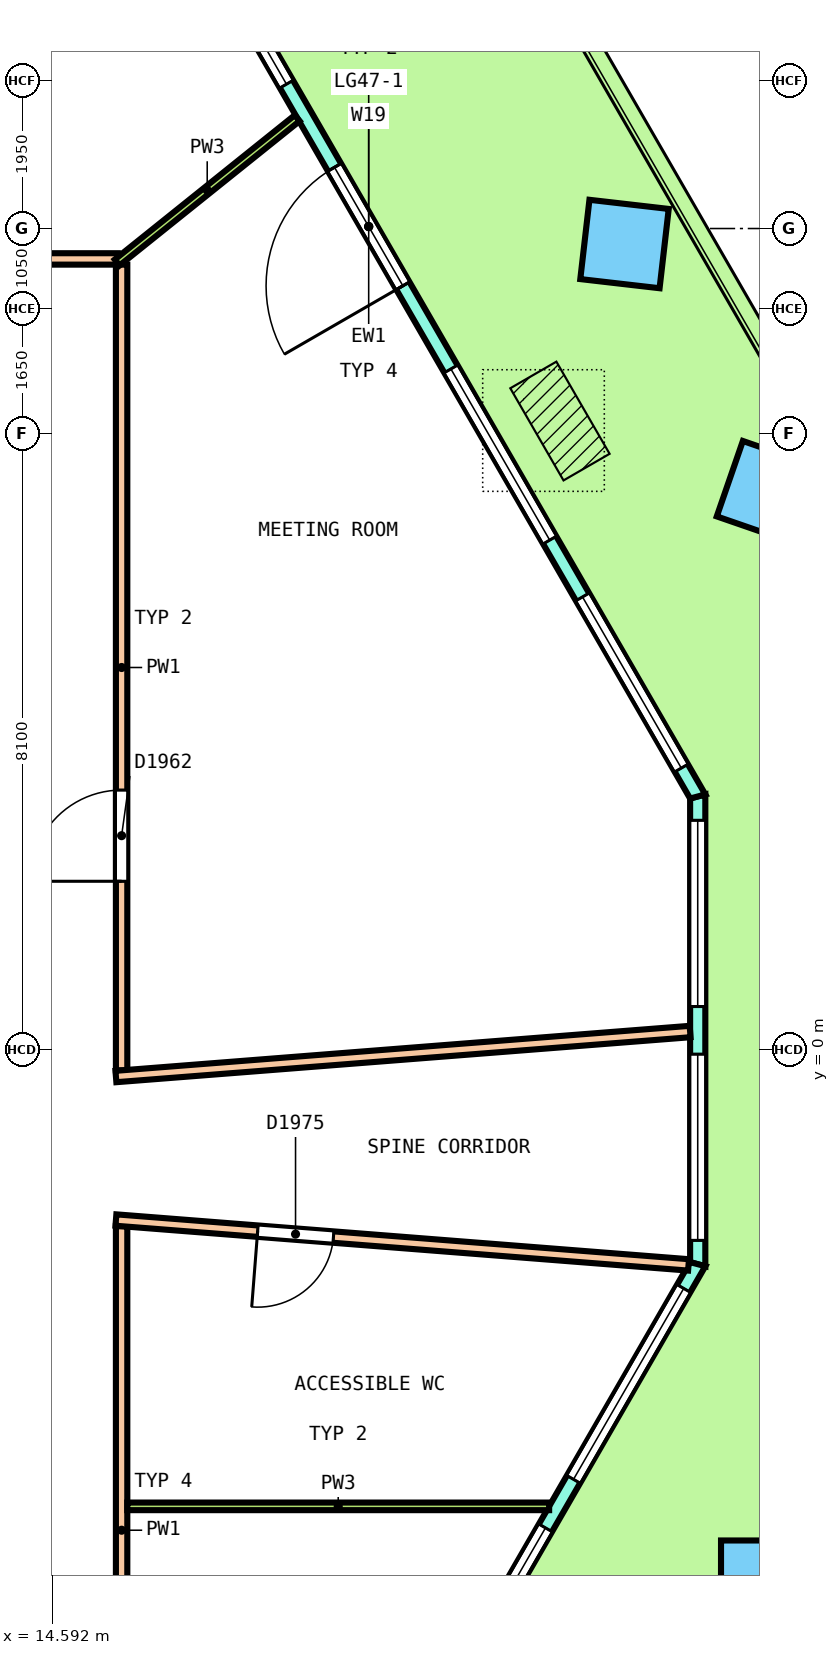
"""IFC4 building model, lengths in metres.
Left out: names, types, materials, properties, quantities, classifications, styles, units other than length and angle.
Written with IfcOpenShell. Run it as: python <this file> out.ifc"""

import sys

from ifc_helpers import new_model, si_unit, direction, frame, frame_2d, origin, origin_2d, place, context, subcontext, project, spatial, polyline, rectangle, outline, extrude, element, fill, save


model = new_model("IFC4")
c1 = context("Model", 3, precision=1e-05, world=origin(), true_north=direction((0.0, 1.0)))
c2 = subcontext(c1, "Body", "Model", "MODEL_VIEW")
j1 = project(units=[si_unit("LENGTHUNIT", "METRE"), si_unit("PLANEANGLEUNIT", "RADIAN")], contexts=[c1])
p1 = place(None, origin())
s1 = spatial("IfcSite", under=j1, at=p1, CompositionType="ELEMENT")
p2 = place(p1, origin())
s2 = spatial("IfcBuilding", under=s1, at=p2, CompositionType="ELEMENT")
p3 = place(p2, frame((0.0, 0.0, 219.4)))
s3 = spatial("IfcBuildingStorey", under=s2, at=p3, CompositionType="ELEMENT", Elevation=219.4)
p4 = place(p3, frame((23.998, 7.337, 0.0), z_axis=(0.021792492936, 0.025134899828, 0.999446508855), x_axis=(-0.500091534958, 0.865904297285, -0.010872194193)))
e1 = element("IfcColumn", 1, at=p4, inside=s3, PredefinedType="COLUMN", context=c2, shape_type="SweptSolid", body=[
    extrude(rectangle(XDim=1.05, YDim=1.05, at=origin_2d()), origin(), (0.0, 0.0, 1.0), 3.652),
])
p5 = place(p3, frame((22.116, 10.596, 0.0), z_axis=(0.025403639223, 0.018852174371, 0.999499500068), x_axis=(-0.500083888167, 0.865969385556, -0.003623268626)))
e2 = element("IfcColumn", 2, at=p5, inside=s3, PredefinedType="COLUMN", context=c2, shape_type="SweptSolid", body=[
    extrude(rectangle(XDim=1.05, YDim=1.05, at=origin_2d()), origin(), (0.0, 0.0, 1.0), 3.652),
])
p6 = place(p3, frame((23.911, -6.985, 0.0), z_axis=(0.010899708203, 0.018790294509, 0.999764032756), x_axis=(0.501923519979, 0.864639174068, -0.021722770495)))
e3 = element("IfcColumn", 3, at=p6, inside=s3, PredefinedType="COLUMN", context=c2, shape_type="SweptSolid", body=[
    extrude(rectangle(XDim=1.05, YDim=1.05, at=origin_2d()), origin(), (0.0, 0.0, 1.0), 3.651),
])
p7 = place(p3, frame((23.08, -2.825, 0.0), z_axis=(0.0, 0.0, 1.0), x_axis=(0.0, 1.0, 0.0)))
e4 = element("IfcWall", 4, at=p7, inside=s3, PredefinedType="SOLIDWALL", context=c2, shape_type="SweptSolid", body=[
    extrude(outline(polyline([(-0.027, -0.1), (1.008, -0.1), (2.042, -0.1), (3.077, -0.1), (4.111, -0.1), (5.146, -0.1), (6.18, -0.1), (6.126, 0.1), (5.11, 0.1), (4.093, 0.1), (3.077, 0.1), (2.06, 0.1), (1.043, 0.1), (0.027, 0.1), (-0.027, -0.1)])), origin(), (0.0, 0.0, 1.0), 3.7),
])
p8 = place(p7, frame((0.313, 0.0, 0.1)))
e5 = element("IfcOpeningElement", 5, at=p8, cuts=e4, PredefinedType="OPENING", context=c2, shape_type="SweptSolid", body=[
    extrude(rectangle(XDim=2.45, YDim=2.65, at=frame_2d((1.225, 1.325))), frame((0.0, 0.11, 0.0), z_axis=(0.0, -1.0, 0.0), x_axis=(1.0, 0.0, 0.0)), (0.0, 0.0, 1.0), 0.22),
])
p9 = place(p7, frame((3.39, 0.0, 0.1)))
e6 = element("IfcOpeningElement", 6, at=p9, cuts=e4, PredefinedType="OPENING", context=c2, shape_type="SweptSolid", body=[
    extrude(rectangle(XDim=2.45, YDim=2.65, at=frame_2d((1.225, 1.325))), frame((0.0, 0.11, 0.0), z_axis=(0.0, -1.0, 0.0), x_axis=(1.0, 0.0, 0.0)), (0.0, 0.0, 1.0), 0.22),
])
p10 = place(p3, frame((23.08, 3.328, 0.0), z_axis=(0.0, 0.0, 1.0), x_axis=(-0.499999912926, 0.866025454057, 0.0)))
e7 = element("IfcWall", 7, at=p10, inside=s3, PredefinedType="SOLIDWALL", context=c2, shape_type="SweptSolid", body=[
    extrude(outline(polyline([(-0.027, -0.1), (0.995, -0.1), (2.017, -0.1), (3.038, -0.1), (4.06, -0.1), (5.082, -0.1), (6.104, -0.1), (7.125, -0.1), (8.147, -0.1), (9.168, -0.1), (10.19, -0.1), (11.212, -0.1), (12.234, -0.1), (13.255, -0.1), (14.277, -0.1), (15.299, -0.1), (16.321, -0.1), (17.342, -0.1), (17.289, 0.1), (16.273, 0.1), (15.258, 0.1), (14.242, 0.1), (13.227, 0.1), (12.212, 0.1), (11.196, 0.1), (10.181, 0.1), (9.166, 0.1), (8.15, 0.1), (7.135, 0.1), (6.119, 0.1), (5.104, 0.1), (4.088, 0.1), (3.073, 0.1), (2.058, 0.1), (1.042, 0.1), (0.027, 0.1), (-0.027, -0.1)])), origin(), (0.0, 0.0, 1.0), 3.7),
])
p11 = place(p10, frame((0.432, 0.0, 0.1)))
e8 = element("IfcOpeningElement", 8, at=p11, cuts=e7, PredefinedType="OPENING", context=c2, shape_type="SweptSolid", body=[
    extrude(rectangle(XDim=2.6, YDim=2.65, at=frame_2d((1.3, 1.325))), frame((0.0, 0.11, 0.0), z_axis=(0.0, -1.0, 0.0), x_axis=(1.0, 0.0, 0.0)), (0.0, 0.0, 1.0), 0.22),
])
p12 = place(p10, frame((3.895, 0.0, 0.1)))
e9 = element("IfcOpeningElement", 9, at=p12, cuts=e7, PredefinedType="OPENING", context=c2, shape_type="SweptSolid", body=[
    extrude(rectangle(XDim=2.6, YDim=2.65, at=frame_2d((1.3, 1.325))), frame((0.0, 0.11, 0.0), z_axis=(0.0, -1.0, 0.0), x_axis=(1.0, 0.0, 0.0)), (0.0, 0.0, 1.0), 0.22),
])
p13 = place(p10, frame((7.758, 0.0, 0.0)))
e10 = element("IfcOpeningElement", 10, at=p13, cuts=e7, PredefinedType="OPENING", context=c2, shape_type="SweptSolid", body=[
    extrude(rectangle(XDim=1.8, YDim=2.4, at=frame_2d((0.9, 1.2))), frame((0.0, 0.11, 0.0), z_axis=(0.0, -1.0, 0.0), x_axis=(1.0, 0.0, 0.0)), (0.0, 0.0, 1.0), 0.22),
])
p14 = place(p10, frame((7.758, 0.0, 2.55)))
e11 = element("IfcOpeningElement", 11, at=p14, cuts=e7, PredefinedType="OPENING", context=c2, shape_type="SweptSolid", body=[
    extrude(rectangle(XDim=1.8, YDim=0.2, at=frame_2d((0.9, 0.1))), frame((0.0, 0.11, 0.0), z_axis=(0.0, -1.0, 0.0), x_axis=(1.0, 0.0, 0.0)), (0.0, 0.0, 1.0), 0.22),
])
p15 = place(p10, frame((10.821, 0.0, 0.1)))
e12 = element("IfcOpeningElement", 12, at=p15, cuts=e7, PredefinedType="OPENING", context=c2, shape_type="SweptSolid", body=[
    extrude(rectangle(XDim=2.6, YDim=2.65, at=frame_2d((1.3, 1.325))), frame((0.0, 0.11, 0.0), z_axis=(0.0, -1.0, 0.0), x_axis=(1.0, 0.0, 0.0)), (0.0, 0.0, 1.0), 0.22),
])
p16 = place(p10, frame((14.284, 0.0, 0.1)))
e13 = element("IfcOpeningElement", 13, at=p16, cuts=e7, PredefinedType="OPENING", context=c2, shape_type="SweptSolid", body=[
    extrude(rectangle(XDim=2.6, YDim=2.65, at=frame_2d((1.3, 1.325))), frame((0.0, 0.11, 0.0), z_axis=(0.0, -1.0, 0.0), x_axis=(1.0, 0.0, 0.0)), (0.0, 0.0, 1.0), 0.22),
])
p17 = place(p3, frame((13.986, -18.575, 0.0), z_axis=(0.0, 0.0, 1.0), x_axis=(0.500005605865, 0.866022167212, 0.0)))
e14 = element("IfcWall", 14, at=p17, inside=s3, PredefinedType="SOLIDWALL", context=c2, shape_type="SweptSolid", body=[
    extrude(outline(polyline([(-0.027, -0.1), (0.987, -0.1), (2.0, -0.1), (3.013, -0.1), (4.026, -0.1), (5.04, -0.1), (6.053, -0.1), (7.066, -0.1), (8.08, -0.1), (9.093, -0.1), (10.106, -0.1), (11.12, -0.1), (12.133, -0.1), (13.146, -0.1), (14.16, -0.1), (15.173, -0.1), (16.187, -0.1), (17.2, -0.1), (18.213, -0.1), (18.159, 0.1), (17.152, 0.1), (16.145, 0.1), (15.137, 0.1), (14.13, 0.1), (13.123, 0.1), (12.115, 0.1), (11.108, 0.1), (10.101, 0.1), (9.093, 0.1), (8.086, 0.1), (7.078, 0.1), (6.071, 0.1), (5.064, 0.1), (4.056, 0.1), (3.049, 0.1), (2.042, 0.1), (1.034, 0.1), (0.027, 0.1), (-0.027, -0.1)])), origin(), (0.0, 0.0, 1.0), 3.7),
])
p18 = place(p17, frame((0.369, 0.0, 0.1)))
e15 = element("IfcOpeningElement", 15, at=p18, cuts=e14, PredefinedType="OPENING", context=c2, shape_type="SweptSolid", body=[
    extrude(rectangle(XDim=2.9, YDim=2.65, at=frame_2d((1.45, 1.325))), frame((0.0, 0.11, 0.0), z_axis=(0.0, -1.0, 0.0), x_axis=(1.0, 0.0, 0.0)), (0.0, 0.0, 1.0), 0.22),
])
p19 = place(p17, frame((4.006, 0.0, 0.1)))
e16 = element("IfcOpeningElement", 16, at=p19, cuts=e14, PredefinedType="OPENING", context=c2, shape_type="SweptSolid", body=[
    extrude(rectangle(XDim=2.9, YDim=2.65, at=frame_2d((1.45, 1.325))), frame((0.0, 0.11, 0.0), z_axis=(0.0, -1.0, 0.0), x_axis=(1.0, 0.0, 0.0)), (0.0, 0.0, 1.0), 0.22),
])
p20 = place(p17, frame((8.193, 0.0, 0.0)))
e17 = element("IfcOpeningElement", 17, at=p20, cuts=e14, PredefinedType="OPENING", context=c2, shape_type="SweptSolid", body=[
    extrude(rectangle(XDim=1.8, YDim=2.4, at=frame_2d((0.9, 1.2))), frame((0.0, 0.11, 0.0), z_axis=(0.0, -1.0, 0.0), x_axis=(1.0, 0.0, 0.0)), (0.0, 0.0, 1.0), 0.22),
])
p21 = place(p17, frame((8.193, 0.0, 2.55)))
e18 = element("IfcOpeningElement", 18, at=p21, cuts=e14, PredefinedType="OPENING", context=c2, shape_type="SweptSolid", body=[
    extrude(rectangle(XDim=1.8, YDim=0.2, at=frame_2d((0.9, 0.1))), frame((0.0, 0.11, 0.0), z_axis=(0.0, -1.0, 0.0), x_axis=(1.0, 0.0, 0.0)), (0.0, 0.0, 1.0), 0.22),
])
p22 = place(p17, frame((11.281, 0.0, 0.1)))
e19 = element("IfcOpeningElement", 19, at=p22, cuts=e14, PredefinedType="OPENING", context=c2, shape_type="SweptSolid", body=[
    extrude(rectangle(XDim=2.9, YDim=2.65, at=frame_2d((1.45, 1.325))), frame((0.0, 0.11, 0.0), z_axis=(0.0, -1.0, 0.0), x_axis=(1.0, 0.0, 0.0)), (0.0, 0.0, 1.0), 0.22),
])
p23 = place(p17, frame((14.918, 0.0, 0.1)))
e20 = element("IfcOpeningElement", 20, at=p23, cuts=e14, PredefinedType="OPENING", context=c2, shape_type="SweptSolid", body=[
    extrude(rectangle(XDim=2.9, YDim=2.65, at=frame_2d((1.45, 1.325))), frame((0.0, 0.11, 0.0), z_axis=(0.0, -1.0, 0.0), x_axis=(1.0, 0.0, 0.0)), (0.0, 0.0, 1.0), 0.22),
])
p24 = place(p3, frame((15.5, -10.325, 0.0), z_axis=(0.0, 0.0, 1.0), x_axis=(0.0, 1.0, 0.0)))
e21 = element("IfcWall", 21, at=p24, inside=s3, PredefinedType="PARTITIONING", context=c2, shape_type="SweptSolid", body=[
    extrude(rectangle(XDim=8.0, YDim=0.15, at=frame_2d((4.0, 0.0))), origin(), (0.0, 0.0, 1.0), 2.8),
])
p25 = place(p24, frame((1.216, 0.0, 0.0)))
e22 = element("IfcOpeningElement", 22, at=p25, cuts=e21, PredefinedType="OPENING", context=c2, shape_type="SweptSolid", body=[
    extrude(rectangle(XDim=1.0, YDim=2.1, at=frame_2d((0.5, 1.05))), frame((0.0, 0.085, 0.0), z_axis=(0.0, -1.0, 0.0), x_axis=(1.0, 0.0, 0.0)), (0.0, 0.0, 1.0), 0.17),
])
p26 = place(p3, frame((15.5, -0.275, 0.0), z_axis=(0.0, 0.0, 1.0), x_axis=(0.0, 1.0, 0.0)))
e23 = element("IfcWall", 23, at=p26, inside=s3, PredefinedType="PARTITIONING", context=c2, shape_type="SweptSolid", body=[
    extrude(rectangle(XDim=10.6, YDim=0.15, at=frame_2d((5.3, 0.0))), origin(), (0.0, 0.0, 1.0), 2.8),
])
p27 = place(p26, frame((2.488, 0.0, 0.0)))
e24 = element("IfcOpeningElement", 24, at=p27, cuts=e23, PredefinedType="OPENING", context=c2, shape_type="SweptSolid", body=[
    extrude(rectangle(XDim=1.2, YDim=2.1, at=frame_2d((0.6, 1.05))), frame((0.0, 0.085, 0.0), z_axis=(0.0, -1.0, 0.0), x_axis=(1.0, 0.0, 0.0)), (0.0, 0.0, 1.0), 0.17),
])
p28 = place(p3, frame((-15.425, 10.4, 0.0), z_axis=(0.0, 0.0, 1.0), x_axis=(1.0, 0.0, 0.0)))
e25 = element("IfcWall", 25, at=p28, inside=s3, PredefinedType="PARTITIONING", context=c2, shape_type="SweptSolid", body=[
    extrude(rectangle(XDim=30.875, YDim=0.15, at=frame_2d((15.438, 0.0))), origin(), (0.0, 0.0, 1.0), 2.8),
])
p29 = place(p28, frame((20.292, 0.0, 0.0)))
e26 = element("IfcOpeningElement", 26, at=p29, cuts=e25, PredefinedType="OPENING", context=c2, shape_type="SweptSolid", body=[
    extrude(rectangle(XDim=1.2, YDim=2.1, at=frame_2d((0.6, 1.05))), frame((0.0, 0.085, 0.0), z_axis=(0.0, -1.0, 0.0), x_axis=(1.0, 0.0, 0.0)), (0.0, 0.0, 1.0), 0.17),
])
p30 = place(p28, frame((11.177, 0.0, 0.0)))
e27 = element("IfcOpeningElement", 27, at=p30, cuts=e25, PredefinedType="OPENING", context=c2, shape_type="SweptSolid", body=[
    extrude(rectangle(XDim=1.2, YDim=2.1, at=frame_2d((0.6, 1.05))), frame((0.0, 0.085, 0.0), z_axis=(0.0, -1.0, 0.0), x_axis=(1.0, 0.0, 0.0)), (0.0, 0.0, 1.0), 0.17),
])
p31 = place(p28, frame((3.187, 0.0, 0.0)))
e28 = element("IfcOpeningElement", 28, at=p31, cuts=e25, PredefinedType="OPENING", context=c2, shape_type="SweptSolid", body=[
    extrude(rectangle(XDim=1.2, YDim=2.1, at=frame_2d((0.6, 1.05))), frame((0.0, 0.085, 0.0), z_axis=(0.0, -1.0, 0.0), x_axis=(1.0, 0.0, 0.0)), (0.0, 0.0, 1.0), 0.17),
])
p32 = place(p3, frame((15.425, -0.356, 0.0), z_axis=(0.0, 0.0, 1.0), x_axis=(0.996945465272, 0.078100827607, 0.0)))
e29 = element("IfcWall", 29, at=p32, inside=s3, PredefinedType="PARTITIONING", context=c2, shape_type="SweptSolid", body=[
    extrude(rectangle(XDim=7.577, YDim=0.15, at=frame_2d((3.789, 0.0))), origin(), (0.0, 0.0, 1.0), 2.8),
])
p33 = place(p3, frame((15.425, -2.244, 0.0), z_axis=(0.0, 0.0, 1.0), x_axis=(0.996946126236, -0.078092390041, 0.0)))
e30 = element("IfcWall", 30, at=p33, inside=s3, PredefinedType="PARTITIONING", context=c2, shape_type="SweptSolid", body=[
    extrude(rectangle(XDim=7.556, YDim=0.15, at=frame_2d((3.778, 0.0))), origin(), (0.0, 0.0, 1.0), 2.8),
])
p34 = place(p33, frame((1.87, 0.0, 0.0)))
e31 = element("IfcOpeningElement", 31, at=p34, cuts=e30, PredefinedType="OPENING", context=c2, shape_type="SweptSolid", body=[
    extrude(rectangle(XDim=1.0, YDim=2.1, at=frame_2d((0.5, 1.05))), frame((0.0, 0.085, 0.0), z_axis=(0.0, -1.0, 0.0), x_axis=(1.0, 0.0, 0.0)), (0.0, 0.0, 1.0), 0.17),
])
p35 = place(p3, frame((15.441, 10.353, 0.0), z_axis=(0.0, 0.0, 1.0), x_axis=(0.78011546614, 0.625635564438, 0.0)))
e32 = element("IfcWall", 32, at=p35, inside=s3, PredefinedType="PARTITIONING", context=c2, shape_type="SweptSolid", body=[
    extrude(rectangle(XDim=3.038, YDim=0.1, at=frame_2d((1.519, 0.0))), origin(), (0.0, 0.0, 1.0), 2.8),
])
p36 = place(p3, frame((15.575, -6.011, 0.0), z_axis=(0.0, 0.0, 1.0), x_axis=(1.0, 0.0, 0.0)))
e33 = element("IfcWall", 33, at=p36, inside=s3, PredefinedType="PARTITIONING", context=c2, shape_type="SweptSolid", body=[
    extrude(rectangle(XDim=5.55, YDim=0.1, at=frame_2d((2.775, 0.0))), origin(), (0.0, 0.0, 1.0), 2.8),
])
p37 = place(p8, origin())
e34 = element("IfcWindow", 34, at=p37, inside=s3, PartitioningType="SINGLE_PANEL", PredefinedType="WINDOW", context=c2, shape_type="SweptSolid", body=[
    extrude(rectangle(XDim=2.45, YDim=2.65, at=frame_2d((1.225, 1.325))), frame((0.0, 0.03, 0.0), z_axis=(0.0, -1.0, 0.0), x_axis=(1.0, 0.0, 0.0)), (0.0, 0.0, 1.0), 0.06),
])
fill(e5, e34)
p38 = place(p9, origin())
e35 = element("IfcWindow", 35, at=p38, inside=s3, PartitioningType="SINGLE_PANEL", PredefinedType="WINDOW", context=c2, shape_type="SweptSolid", body=[
    extrude(rectangle(XDim=2.45, YDim=2.65, at=frame_2d((1.225, 1.325))), frame((0.0, 0.03, 0.0), z_axis=(0.0, -1.0, 0.0), x_axis=(1.0, 0.0, 0.0)), (0.0, 0.0, 1.0), 0.06),
])
fill(e6, e35)
p39 = place(p11, origin())
e36 = element("IfcWindow", 36, at=p39, inside=s3, PartitioningType="SINGLE_PANEL", PredefinedType="WINDOW", context=c2, shape_type="SweptSolid", body=[
    extrude(rectangle(XDim=2.6, YDim=2.65, at=frame_2d((1.3, 1.325))), frame((0.0, 0.03, 0.0), z_axis=(0.0, -1.0, 0.0), x_axis=(1.0, 0.0, 0.0)), (0.0, 0.0, 1.0), 0.06),
])
fill(e8, e36)
p40 = place(p12, origin())
e37 = element("IfcWindow", 37, at=p40, inside=s3, PartitioningType="SINGLE_PANEL", PredefinedType="WINDOW", context=c2, shape_type="SweptSolid", body=[
    extrude(rectangle(XDim=2.6, YDim=2.65, at=frame_2d((1.3, 1.325))), frame((0.0, 0.03, 0.0), z_axis=(0.0, -1.0, 0.0), x_axis=(1.0, 0.0, 0.0)), (0.0, 0.0, 1.0), 0.06),
])
fill(e9, e37)
p41 = place(p13, origin())
e38 = element("IfcDoor", 38, at=p41, inside=s3, OperationType="DOUBLE_DOOR_SINGLE_SWING", PredefinedType="DOOR", context=c2, shape_type="SweptSolid", body=[
    extrude(rectangle(XDim=1.8, YDim=2.4, at=frame_2d((0.9, 1.2))), frame((0.0, 0.025, 0.0), z_axis=(0.0, -1.0, 0.0), x_axis=(1.0, 0.0, 0.0)), (0.0, 0.0, 1.0), 0.05),
])
fill(e10, e38)
p42 = place(p14, origin())
e39 = element("IfcWindow", 39, at=p42, inside=s3, PartitioningType="SINGLE_PANEL", PredefinedType="WINDOW", context=c2, shape_type="SweptSolid", body=[
    extrude(rectangle(XDim=1.8, YDim=0.2, at=frame_2d((0.9, 0.1))), frame((0.0, 0.03, 0.0), z_axis=(0.0, -1.0, 0.0), x_axis=(1.0, 0.0, 0.0)), (0.0, 0.0, 1.0), 0.06),
])
fill(e11, e39)
p43 = place(p15, origin())
e40 = element("IfcWindow", 40, at=p43, inside=s3, PartitioningType="SINGLE_PANEL", PredefinedType="WINDOW", context=c2, shape_type="SweptSolid", body=[
    extrude(rectangle(XDim=2.6, YDim=2.65, at=frame_2d((1.3, 1.325))), frame((0.0, 0.03, 0.0), z_axis=(0.0, -1.0, 0.0), x_axis=(1.0, 0.0, 0.0)), (0.0, 0.0, 1.0), 0.06),
])
fill(e12, e40)
p44 = place(p22, origin())
e41 = element("IfcWindow", 41, at=p44, inside=s3, PartitioningType="SINGLE_PANEL", PredefinedType="WINDOW", context=c2, shape_type="SweptSolid", body=[
    extrude(rectangle(XDim=2.9, YDim=2.65, at=frame_2d((1.45, 1.325))), frame((0.0, 0.03, 0.0), z_axis=(0.0, -1.0, 0.0), x_axis=(1.0, 0.0, 0.0)), (0.0, 0.0, 1.0), 0.06),
])
fill(e19, e41)
p45 = place(p23, origin())
e42 = element("IfcWindow", 42, at=p45, inside=s3, PartitioningType="SINGLE_PANEL", PredefinedType="WINDOW", context=c2, shape_type="SweptSolid", body=[
    extrude(rectangle(XDim=2.9, YDim=2.65, at=frame_2d((1.45, 1.325))), frame((0.0, 0.03, 0.0), z_axis=(0.0, -1.0, 0.0), x_axis=(1.0, 0.0, 0.0)), (0.0, 0.0, 1.0), 0.06),
])
fill(e20, e42)
p46 = place(p27, origin())
e43 = element("IfcDoor", 43, at=p46, inside=s3, OperationType="DOUBLE_DOOR_SINGLE_SWING", PredefinedType="DOOR", context=c2, shape_type="SweptSolid", body=[
    extrude(rectangle(XDim=1.2, YDim=2.1, at=frame_2d((0.6, 1.05))), frame((0.0, 0.025, 0.0), z_axis=(0.0, -1.0, 0.0), x_axis=(1.0, 0.0, 0.0)), (0.0, 0.0, 1.0), 0.05),
])
fill(e24, e43)
p47 = place(p34, origin())
e44 = element("IfcDoor", 44, at=p47, inside=s3, OperationType="SINGLE_SWING_RIGHT", PredefinedType="DOOR", context=c2, shape_type="SweptSolid", body=[
    extrude(rectangle(XDim=1.0, YDim=2.1, at=frame_2d((0.5, 1.05))), frame((0.0, 0.025, 0.0), z_axis=(0.0, -1.0, 0.0), x_axis=(1.0, 0.0, 0.0)), (0.0, 0.0, 1.0), 0.05),
])
fill(e31, e44)
save(model, sys.argv[1])
